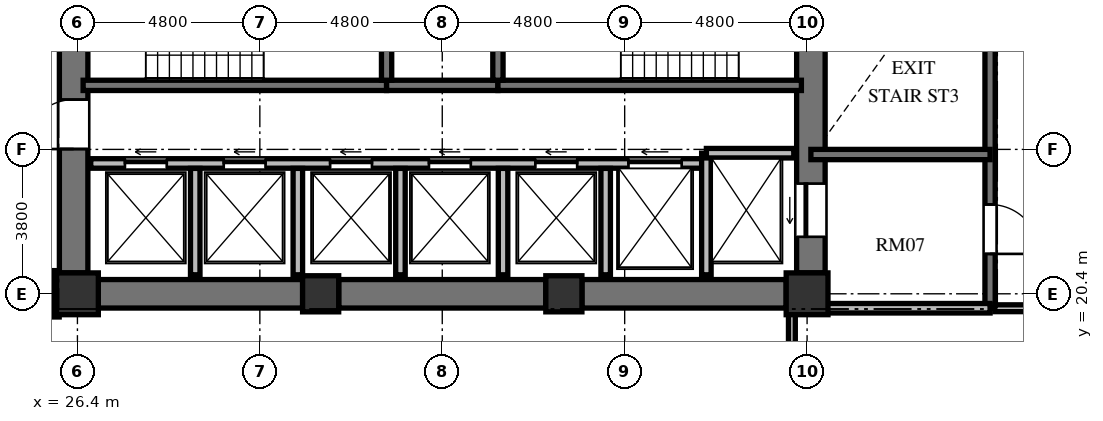
"""IFC4 building model, lengths in metres.
Left out: names, types, materials, properties, quantities, classifications, styles, units other than length and angle.
Written with IfcOpenShell. Run it as: python <this file> out.ifc"""

import sys

from ifc_helpers import new_model, si_unit, direction, frame, frame_2d, origin, origin_2d, place, context, subcontext, project, spatial, rectangle, extrude, element, fill, save


model = new_model("IFC4")
c1 = context("Model", 3, precision=1e-05, world=origin(), true_north=direction((0.0, 1.0)))
c2 = subcontext(c1, "Body", "Model", "MODEL_VIEW")
j1 = project(units=[si_unit("LENGTHUNIT", "METRE"), si_unit("PLANEANGLEUNIT", "RADIAN")], contexts=[c1])
p1 = place(None, origin())
s1 = spatial("IfcSite", under=j1, at=p1, CompositionType="ELEMENT")
p2 = place(p1, origin())
s2 = spatial("IfcBuilding", under=s1, at=p2, CompositionType="ELEMENT")
p3 = place(p2, frame((0.0, 0.0, 121.872)))
s3 = spatial("IfcBuildingStorey", under=s2, at=p3, CompositionType="ELEMENT", Elevation=121.872)
p4 = place(p3, frame((26.4, 20.4, 0.0), z_axis=(0.0, 0.0, 1.0), x_axis=(1.0, 0.0, 0.0)))
e1 = element("IfcColumn", 1, at=p4, inside=s3, PredefinedType="COLUMN", context=c2, shape_type="SweptSolid", body=[
    extrude(rectangle(XDim=1.1, YDim=1.1, at=origin_2d()), origin(), (0.0, 0.0, 1.0), 3.648),
])
for number, where, z_axis, x_axis in (
    (2, (32.8, 20.4, 0.0), (0.0, 0.0, 1.0), (1.0, 0.0, 0.0)),
    (3, (39.2, 20.4, 0.0), (0.0, 0.0, 1.0), (1.0, 0.0, 0.0)),
):
    element("IfcColumn", number, at=place(p3, frame(where, z_axis=z_axis, x_axis=x_axis)), inside=s3, PredefinedType="COLUMN", context=c2, shape_type="SweptSolid", body=[
        extrude(rectangle(XDim=0.95, YDim=0.95, at=origin_2d()), origin(), (0.0, 0.0, 1.0), 3.648),
    ])
p5 = place(p3, frame((45.6, 20.4, 0.0), z_axis=(0.0, 0.0, 1.0), x_axis=(1.0, 0.0, 0.0)))
e4 = element("IfcColumn", 4, at=p5, inside=s3, PredefinedType="COLUMN", context=c2, shape_type="SweptSolid", body=[
    extrude(rectangle(XDim=1.1, YDim=1.1, at=origin_2d()), origin(), (0.0, 0.0, 1.0), 3.648),
])
p6 = place(p3, frame((26.3, 20.95, 0.0), z_axis=(0.0, 0.0, 1.0), x_axis=(0.0, 1.0, 0.0)))
e5 = element("IfcWall", 5, at=p6, inside=s3, PredefinedType="SHEAR", context=c2, shape_type="SweptSolid", body=[
    extrude(rectangle(XDim=14.1, YDim=0.75, at=frame_2d((7.05, 0.0))), origin(), (0.0, 0.0, 1.0), 3.648),
])
p7 = place(p6, frame((6.5, 0.0, 0.0)))
e6 = element("IfcOpeningElement", 6, at=p7, cuts=e5, PredefinedType="OPENING", context=c2, shape_type="SweptSolid", body=[
    extrude(rectangle(XDim=1.2, YDim=2.15, at=frame_2d((0.6, 1.075))), frame((0.0, 0.385, 0.0), z_axis=(0.0, -1.0, 0.0), x_axis=(1.0, 0.0, 0.0)), (0.0, 0.0, 1.0), 0.77),
])
p8 = place(p6, frame((9.6, 0.0, 0.0)))
e7 = element("IfcOpeningElement", 7, at=p8, cuts=e5, PredefinedType="OPENING", context=c2, shape_type="SweptSolid", body=[
    extrude(rectangle(XDim=1.3, YDim=2.2, at=frame_2d((0.65, 1.1))), frame((0.0, 0.385, 0.0), z_axis=(0.0, -1.0, 0.0), x_axis=(1.0, 0.0, 0.0)), (0.0, 0.0, 1.0), 0.77),
])
p9 = place(p6, frame((3.26, 0.0, 0.0)))
e8 = element("IfcOpeningElement", 8, at=p9, cuts=e5, PredefinedType="OPENING", context=c2, shape_type="SweptSolid", body=[
    extrude(rectangle(XDim=1.3, YDim=2.2, at=frame_2d((0.65, 1.1))), frame((0.0, 0.385, 0.0), z_axis=(0.0, -1.0, 0.0), x_axis=(1.0, 0.0, 0.0)), (0.0, 0.0, 1.0), 0.77),
])
p10 = place(p3, frame((45.7, 20.95, 0.0), z_axis=(0.0, 0.0, 1.0), x_axis=(0.0, 1.0, 0.0)))
e9 = element("IfcWall", 9, at=p10, inside=s3, PredefinedType="SHEAR", context=c2, shape_type="SweptSolid", body=[
    extrude(rectangle(XDim=14.1, YDim=0.75, at=frame_2d((7.05, 0.0))), origin(), (0.0, 0.0, 1.0), 3.648),
])
p11 = place(p10, frame((11.75, 0.0, 0.0)))
e10 = element("IfcOpeningElement", 10, at=p11, cuts=e9, PredefinedType="OPENING", context=c2, shape_type="SweptSolid", body=[
    extrude(rectangle(XDim=1.4, YDim=2.3, at=frame_2d((0.7, 1.15))), frame((0.0, 0.385, 0.0), z_axis=(0.0, -1.0, 0.0), x_axis=(1.0, 0.0, 0.0)), (0.0, 0.0, 1.0), 0.77),
])
p12 = place(p10, frame((0.95, 0.0, 0.0)))
e11 = element("IfcOpeningElement", 11, at=p12, cuts=e9, PredefinedType="OPENING", context=c2, shape_type="SweptSolid", body=[
    extrude(rectangle(XDim=1.4, YDim=2.3, at=frame_2d((0.7, 1.15))), frame((0.0, 0.385, 0.0), z_axis=(0.0, -1.0, 0.0), x_axis=(1.0, 0.0, 0.0)), (0.0, 0.0, 1.0), 0.77),
])
p13 = place(p3, frame((26.95, 20.4, 0.0), z_axis=(0.0, 0.0, 1.0), x_axis=(1.0, 0.0, 0.0)))
e12 = element("IfcWall", 12, at=p13, inside=s3, PredefinedType="SHEAR", context=c2, shape_type="SweptSolid", body=[
    extrude(rectangle(XDim=5.375, YDim=0.75, at=frame_2d((2.688, 0.0))), origin(), (0.0, 0.0, 1.0), 3.648),
])
p14 = place(p3, frame((33.275, 20.4, 0.0), z_axis=(0.0, 0.0, 1.0), x_axis=(1.0, 0.0, 0.0)))
e13 = element("IfcWall", 13, at=p14, inside=s3, PredefinedType="SHEAR", context=c2, shape_type="SweptSolid", body=[
    extrude(rectangle(XDim=5.45, YDim=0.75, at=frame_2d((2.725, 0.0))), origin(), (0.0, 0.0, 1.0), 3.648),
])
p15 = place(p3, frame((39.675, 20.4, 0.0), z_axis=(0.0, 0.0, 1.0), x_axis=(1.0, 0.0, 0.0)))
e14 = element("IfcWall", 14, at=p15, inside=s3, PredefinedType="SHEAR", context=c2, shape_type="SweptSolid", body=[
    extrude(rectangle(XDim=5.375, YDim=0.75, at=frame_2d((2.688, 0.0))), origin(), (0.0, 0.0, 1.0), 3.648),
])
p16 = place(p3, frame((26.55, 25.885, 0.0), z_axis=(0.0, 0.0, 1.0), x_axis=(1.0, 0.0, 0.0)))
e15 = element("IfcWall", 15, at=p16, inside=s3, PredefinedType="SHEAR", context=c2, shape_type="SweptSolid", body=[
    extrude(rectangle(XDim=7.985, YDim=0.27, at=frame_2d((3.992, 0.0))), origin(), (0.0, 0.0, 1.0), 3.648),
])
p17 = place(p3, frame((34.535, 25.885, 0.0), z_axis=(0.0, 0.0, 1.0), x_axis=(1.0, 0.0, 0.0)))
e16 = element("IfcWall", 16, at=p17, inside=s3, PredefinedType="SHEAR", context=c2, shape_type="SweptSolid", body=[
    extrude(rectangle(XDim=2.93, YDim=0.27, at=frame_2d((1.465, 0.0))), origin(), (0.0, 0.0, 1.0), 3.648),
])
p18 = place(p3, frame((37.465, 25.885, 0.0), z_axis=(0.0, 0.0, 1.0), x_axis=(1.0, 0.0, 0.0)))
e17 = element("IfcWall", 17, at=p18, inside=s3, PredefinedType="SHEAR", context=c2, shape_type="SweptSolid", body=[
    extrude(rectangle(XDim=7.985, YDim=0.27, at=frame_2d((3.992, 0.0))), origin(), (0.0, 0.0, 1.0), 3.648),
])
for number, where, z_axis, x_axis in (
    (18, (34.535, 26.02, 0.0), (0.0, 0.0, 1.0), (0.0, 1.0, 0.0)),
    (19, (37.465, 26.02, 0.0), (0.0, 0.0, 1.0), (0.0, 1.0, 0.0)),
):
    element("IfcWall", number, at=place(p3, frame(where, z_axis=z_axis, x_axis=x_axis)), inside=s3, PredefinedType="SHEAR", context=c2, shape_type="SweptSolid", body=[
        extrude(rectangle(XDim=4.08, YDim=0.27, at=frame_2d((2.04, 0.0))), origin(), (0.0, 0.0, 1.0), 3.648),
    ])
p19 = place(p3, frame((26.75, 23.83, 0.0), z_axis=(0.0, 0.0, 1.0), x_axis=(1.0, 0.0, 0.0)))
e20 = element("IfcWall", 20, at=p19, inside=s3, PredefinedType="SOLIDWALL", context=c2, shape_type="SweptSolid", body=[
    extrude(rectangle(XDim=16.2, YDim=0.25, at=frame_2d((8.1, 0.0))), origin(), (0.0, 0.0, 1.0), 3.428),
])
p20 = place(p19, frame((0.9, 0.0, 0.0)))
e21 = element("IfcOpeningElement", 21, at=p20, cuts=e20, PredefinedType="OPENING", context=c2, shape_type="SweptSolid", body=[
    extrude(rectangle(XDim=1.1, YDim=2.2, at=frame_2d((0.55, 1.1))), frame((0.0, 0.135, 0.0), z_axis=(0.0, -1.0, 0.0), x_axis=(1.0, 0.0, 0.0)), (0.0, 0.0, 1.0), 0.27),
])
p21 = place(p19, frame((3.5, 0.0, 0.0)))
e22 = element("IfcOpeningElement", 22, at=p21, cuts=e20, PredefinedType="OPENING", context=c2, shape_type="SweptSolid", body=[
    extrude(rectangle(XDim=1.1, YDim=2.2, at=frame_2d((0.55, 1.1))), frame((0.0, 0.135, 0.0), z_axis=(0.0, -1.0, 0.0), x_axis=(1.0, 0.0, 0.0)), (0.0, 0.0, 1.0), 0.27),
])
p22 = place(p19, frame((6.3, 0.0, 0.0)))
e23 = element("IfcOpeningElement", 23, at=p22, cuts=e20, PredefinedType="OPENING", context=c2, shape_type="SweptSolid", body=[
    extrude(rectangle(XDim=1.1, YDim=2.2, at=frame_2d((0.55, 1.1))), frame((0.0, 0.135, 0.0), z_axis=(0.0, -1.0, 0.0), x_axis=(1.0, 0.0, 0.0)), (0.0, 0.0, 1.0), 0.27),
])
p23 = place(p19, frame((8.9, 0.0, 0.0)))
e24 = element("IfcOpeningElement", 24, at=p23, cuts=e20, PredefinedType="OPENING", context=c2, shape_type="SweptSolid", body=[
    extrude(rectangle(XDim=1.1, YDim=2.2, at=frame_2d((0.55, 1.1))), frame((0.0, 0.135, 0.0), z_axis=(0.0, -1.0, 0.0), x_axis=(1.0, 0.0, 0.0)), (0.0, 0.0, 1.0), 0.27),
])
p24 = place(p19, frame((11.7, 0.0, 0.0)))
e25 = element("IfcOpeningElement", 25, at=p24, cuts=e20, PredefinedType="OPENING", context=c2, shape_type="SweptSolid", body=[
    extrude(rectangle(XDim=1.1, YDim=2.2, at=frame_2d((0.55, 1.1))), frame((0.0, 0.135, 0.0), z_axis=(0.0, -1.0, 0.0), x_axis=(1.0, 0.0, 0.0)), (0.0, 0.0, 1.0), 0.27),
])
p25 = place(p19, frame((14.15, 0.0, 0.0)))
e26 = element("IfcOpeningElement", 26, at=p25, cuts=e20, PredefinedType="OPENING", context=c2, shape_type="SweptSolid", body=[
    extrude(rectangle(XDim=1.4, YDim=2.3, at=frame_2d((0.7, 1.15))), frame((0.0, 0.135, 0.0), z_axis=(0.0, -1.0, 0.0), x_axis=(1.0, 0.0, 0.0)), (0.0, 0.0, 1.0), 0.27),
])
p26 = place(p3, frame((42.95, 20.9, 0.0), z_axis=(0.0, 0.0, 1.0), x_axis=(0.0, 1.0, 0.0)))
e27 = element("IfcWall", 27, at=p26, inside=s3, PredefinedType="SOLIDWALL", context=c2, shape_type="SweptSolid", body=[
    extrude(rectangle(XDim=3.2, YDim=0.25, at=frame_2d((1.6, 0.0))), origin(), (0.0, 0.0, 1.0), 3.428),
])
p27 = place(p3, frame((42.95, 24.1, 0.0), z_axis=(0.0, 0.0, 1.0), x_axis=(1.0, 0.0, 0.0)))
e28 = element("IfcWall", 28, at=p27, inside=s3, PredefinedType="SOLIDWALL", context=c2, shape_type="SweptSolid", body=[
    extrude(rectangle(XDim=2.3, YDim=0.25, at=frame_2d((1.15, 0.0))), origin(), (0.0, 0.0, 1.0), 3.428),
])
for number, where, z_axis, x_axis in (
    (29, (29.5, 20.9, 0.0), (0.0, 0.0, 1.0), (0.0, 1.0, 0.0)),
    (30, (32.2, 20.9, 0.0), (0.0, 0.0, 1.0), (0.0, 1.0, 0.0)),
    (31, (34.9, 20.9, 0.0), (0.0, 0.0, 1.0), (0.0, 1.0, 0.0)),
    (32, (37.6, 20.9, 0.0), (0.0, 0.0, 1.0), (0.0, 1.0, 0.0)),
    (33, (40.3, 20.9, 0.0), (0.0, 0.0, 1.0), (0.0, 1.0, 0.0)),
):
    element("IfcWall", number, at=place(p3, frame(where, z_axis=z_axis, x_axis=x_axis)), inside=s3, PredefinedType="SOLIDWALL", context=c2, shape_type="SweptSolid", body=[
        extrude(rectangle(XDim=2.8, YDim=0.25, at=frame_2d((1.4, 0.0))), origin(), (0.0, 0.0, 1.0), 3.428),
    ])
p28 = place(p3, frame((50.415, 35.845, 0.0), z_axis=(0.0, 0.0, 1.0), x_axis=(0.0, -1.0, 0.0)))
e34 = element("IfcWall", 34, at=p28, inside=s3, PredefinedType="SHEAR", context=c2, shape_type="SweptSolid", body=[
    extrude(rectangle(XDim=15.825, YDim=0.27, at=frame_2d((7.913, 0.0))), origin(), (0.0, 0.0, 1.0), 3.648),
])
p29 = place(p28, frame((4.445, 0.0, 0.0)))
e35 = element("IfcOpeningElement", 35, at=p29, cuts=e34, PredefinedType="OPENING", context=c2, shape_type="SweptSolid", body=[
    extrude(rectangle(XDim=1.2, YDim=2.15, at=frame_2d((0.6, 1.075))), frame((0.0, 0.145, 0.0), z_axis=(0.0, -1.0, 0.0), x_axis=(1.0, 0.0, 0.0)), (0.0, 0.0, 1.0), 0.29),
])
p30 = place(p28, frame((1.295, 0.0, 0.0)))
e36 = element("IfcOpeningElement", 36, at=p30, cuts=e34, PredefinedType="OPENING", context=c2, shape_type="SweptSolid", body=[
    extrude(rectangle(XDim=1.3, YDim=2.2, at=frame_2d((0.65, 1.1))), frame((0.0, 0.145, 0.0), z_axis=(0.0, -1.0, 0.0), x_axis=(1.0, 0.0, 0.0)), (0.0, 0.0, 1.0), 0.29),
])
p31 = place(p28, frame((13.095, 0.0, 0.0)))
e37 = element("IfcOpeningElement", 37, at=p31, cuts=e34, PredefinedType="OPENING", context=c2, shape_type="SweptSolid", body=[
    extrude(rectangle(XDim=1.3, YDim=2.2, at=frame_2d((0.65, 1.1))), frame((0.0, 0.145, 0.0), z_axis=(0.0, -1.0, 0.0), x_axis=(1.0, 0.0, 0.0)), (0.0, 0.0, 1.0), 0.29),
])
p32 = place(p3, frame((45.7, 24.065, 0.0), z_axis=(0.0, 0.0, 1.0), x_axis=(1.0, 0.0, 0.0)))
e38 = element("IfcWall", 38, at=p32, inside=s3, PredefinedType="SHEAR", context=c2, shape_type="SweptSolid", body=[
    extrude(rectangle(XDim=4.715, YDim=0.27, at=frame_2d((2.357, 0.0))), origin(), (0.0, 0.0, 1.0), 3.648),
])
p33 = place(p3, frame((45.7, 20.02, 0.0), z_axis=(0.0, 0.0, 1.0), x_axis=(1.0, 0.0, 0.0)))
e39 = element("IfcWall", 39, at=p33, inside=s3, PredefinedType="SOLIDWALL", context=c2, shape_type="SweptSolid", body=[
    extrude(rectangle(XDim=4.715, YDim=0.25, at=frame_2d((2.357, 0.0))), origin(), (0.0, 0.0, 1.0), 3.428),
])
p34 = place(p3, frame((53.19, 20.02, 0.0), z_axis=(0.0, 0.0, 1.0), x_axis=(-1.0, 0.0, 0.0)))
e40 = element("IfcWall", 40, at=p34, inside=s3, PredefinedType="PARTITIONING", context=c2, shape_type="SweptSolid", body=[
    extrude(rectangle(XDim=2.65, YDim=0.18, at=frame_2d((1.325, 0.0))), origin(), (0.0, 0.0, 1.0), 3.428),
])
p35 = place(p3, frame((25.83, 21.01, 0.0), z_axis=(0.0, 0.0, 1.0), x_axis=(0.0, -1.0, 0.0)))
e41 = element("IfcWall", 41, at=p35, inside=s3, PredefinedType="PARTITIONING", context=c2, shape_type="SweptSolid", body=[
    extrude(rectangle(XDim=1.22, YDim=0.18, at=frame_2d((0.61, 0.0))), origin(), (0.0, 0.0, 1.0), 3.428),
])
p36 = place(p3, frame((45.2, 19.91, 0.0), z_axis=(0.0, 0.0, 1.0), x_axis=(0.0, -1.0, 0.0)))
e42 = element("IfcWall", 42, at=p36, inside=s3, PredefinedType="PARTITIONING", context=c2, shape_type="SweptSolid", body=[
    extrude(rectangle(XDim=2.55, YDim=0.18, at=frame_2d((1.275, 0.0))), origin(), (0.0, 0.0, 1.0), 3.428),
])
p37 = place(p9, origin())
e43 = element("IfcDoor", 43, at=p37, inside=s3, OperationType="SINGLE_SWING_LEFT", PredefinedType="DOOR", context=c2, shape_type="SweptSolid", body=[
    extrude(rectangle(XDim=1.3, YDim=2.2, at=frame_2d((0.65, 1.1))), frame((0.0, 0.025, 0.0), z_axis=(0.0, -1.0, 0.0), x_axis=(1.0, 0.0, 0.0)), (0.0, 0.0, 1.0), 0.05),
])
fill(e8, e43)
p38 = place(p20, origin())
e44 = element("IfcDoor", 44, at=p38, inside=s3, OperationType="SLIDING_TO_LEFT", PredefinedType="DOOR", context=c2, shape_type="SweptSolid", body=[
    extrude(rectangle(XDim=1.1, YDim=2.2, at=frame_2d((0.55, 1.1))), frame((0.0, 0.025, 0.0), z_axis=(0.0, -1.0, 0.0), x_axis=(1.0, 0.0, 0.0)), (0.0, 0.0, 1.0), 0.05),
])
fill(e21, e44)
p39 = place(p21, origin())
e45 = element("IfcDoor", 45, at=p39, inside=s3, OperationType="SLIDING_TO_LEFT", PredefinedType="DOOR", context=c2, shape_type="SweptSolid", body=[
    extrude(rectangle(XDim=1.1, YDim=2.2, at=frame_2d((0.55, 1.1))), frame((0.0, 0.025, 0.0), z_axis=(0.0, -1.0, 0.0), x_axis=(1.0, 0.0, 0.0)), (0.0, 0.0, 1.0), 0.05),
])
fill(e22, e45)
p40 = place(p22, origin())
e46 = element("IfcDoor", 46, at=p40, inside=s3, OperationType="SLIDING_TO_LEFT", PredefinedType="DOOR", context=c2, shape_type="SweptSolid", body=[
    extrude(rectangle(XDim=1.1, YDim=2.2, at=frame_2d((0.55, 1.1))), frame((0.0, 0.025, 0.0), z_axis=(0.0, -1.0, 0.0), x_axis=(1.0, 0.0, 0.0)), (0.0, 0.0, 1.0), 0.05),
])
fill(e23, e46)
p41 = place(p23, origin())
e47 = element("IfcDoor", 47, at=p41, inside=s3, OperationType="SLIDING_TO_LEFT", PredefinedType="DOOR", context=c2, shape_type="SweptSolid", body=[
    extrude(rectangle(XDim=1.1, YDim=2.2, at=frame_2d((0.55, 1.1))), frame((0.0, 0.025, 0.0), z_axis=(0.0, -1.0, 0.0), x_axis=(1.0, 0.0, 0.0)), (0.0, 0.0, 1.0), 0.05),
])
fill(e24, e47)
p42 = place(p24, origin())
e48 = element("IfcDoor", 48, at=p42, inside=s3, OperationType="SLIDING_TO_LEFT", PredefinedType="DOOR", context=c2, shape_type="SweptSolid", body=[
    extrude(rectangle(XDim=1.1, YDim=2.2, at=frame_2d((0.55, 1.1))), frame((0.0, 0.025, 0.0), z_axis=(0.0, -1.0, 0.0), x_axis=(1.0, 0.0, 0.0)), (0.0, 0.0, 1.0), 0.05),
])
fill(e25, e48)
p43 = place(p12, origin())
e49 = element("IfcDoor", 49, at=p43, inside=s3, OperationType="SLIDING_TO_LEFT", PredefinedType="DOOR", context=c2, shape_type="SweptSolid", body=[
    extrude(rectangle(XDim=1.4, YDim=2.3, at=frame_2d((0.7, 1.15))), frame((0.0, 0.025, 0.0), z_axis=(0.0, -1.0, 0.0), x_axis=(1.0, 0.0, 0.0)), (0.0, 0.0, 1.0), 0.05),
])
fill(e11, e49)
p44 = place(p25, origin())
e50 = element("IfcDoor", 50, at=p44, inside=s3, OperationType="SLIDING_TO_LEFT", PredefinedType="DOOR", context=c2, shape_type="SweptSolid", body=[
    extrude(rectangle(XDim=1.4, YDim=2.3, at=frame_2d((0.7, 1.15))), frame((0.0, 0.025, 0.0), z_axis=(0.0, -1.0, 0.0), x_axis=(1.0, 0.0, 0.0)), (0.0, 0.0, 1.0), 0.05),
])
fill(e26, e50)
p45 = place(p31, origin())
e51 = element("IfcDoor", 51, at=p45, inside=s3, OperationType="SINGLE_SWING_RIGHT", PredefinedType="DOOR", context=c2, shape_type="SweptSolid", body=[
    extrude(rectangle(XDim=1.3, YDim=2.2, at=frame_2d((0.65, 1.1))), frame((0.0, 0.025, 0.0), z_axis=(0.0, -1.0, 0.0), x_axis=(1.0, 0.0, 0.0)), (0.0, 0.0, 1.0), 0.05),
])
fill(e37, e51)
save(model, sys.argv[1])
